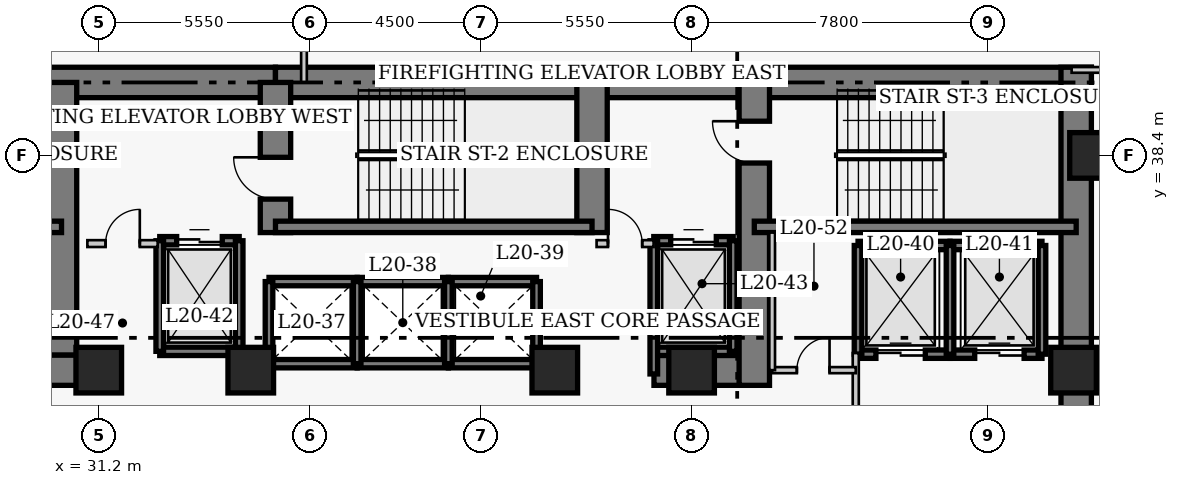
"""IFC4 building model, lengths in metres.
Left out: names, types, materials, properties, quantities, classifications, styles, units other than length and angle.
Written with IfcOpenShell. Run it as: python <this file> out.ifc"""

import sys

from ifc_helpers import new_model, si_unit, direction, frame, frame_2d, origin, origin_2d, place, context, subcontext, project, spatial, rectangle, extrude, element, fill, save


model = new_model("IFC4")
c1 = context("Model", 3, precision=1e-05, world=origin(), true_north=direction((0.0, 1.0)))
c2 = subcontext(c1, "Body", "Model", "MODEL_VIEW")
j1 = project(units=[si_unit("LENGTHUNIT", "METRE"), si_unit("PLANEANGLEUNIT", "RADIAN")], contexts=[c1])
p1 = place(None, origin())
s1 = spatial("IfcSite", under=j1, at=p1, CompositionType="ELEMENT")
p2 = place(p1, origin())
s2 = spatial("IfcBuilding", under=s1, at=p2, CompositionType="ELEMENT")
p3 = place(p2, frame((0.0, 0.0, 84.2)))
s3 = spatial("IfcBuildingStorey", under=s2, at=p3, CompositionType="ELEMENT", Elevation=84.2)
p4 = place(p3, frame((21.5, 40.32, 0.0), z_axis=(0.0, 0.0, 1.0), x_axis=(1.0, 0.0, 0.0)))
e1 = element("IfcWall", 1, at=p4, inside=s3, PredefinedType="SHEAR", context=c2, shape_type="SweptSolid", body=[
    extrude(rectangle(XDim=14.35, YDim=0.8, at=frame_2d((7.175, 0.0))), origin(), (0.0, 0.0, 1.0), 3.8),
])
p5 = place(p3, frame((35.85, 40.32, 0.0), z_axis=(0.0, 0.0, 1.0), x_axis=(1.0, 0.0, 0.0)))
e2 = element("IfcWall", 2, at=p5, inside=s3, PredefinedType="SHEAR", context=c2, shape_type="SweptSolid", body=[
    extrude(rectangle(XDim=12.6, YDim=0.8, at=frame_2d((6.3, 0.0))), origin(), (0.0, 0.0, 1.0), 3.8),
])
p6 = place(p3, frame((48.45, 40.32, 0.0), z_axis=(0.0, 0.0, 1.0), x_axis=(1.0, 0.0, 0.0)))
e3 = element("IfcWall", 3, at=p6, inside=s3, PredefinedType="SHEAR", context=c2, shape_type="SweptSolid", body=[
    extrude(rectangle(XDim=8.87, YDim=0.8, at=frame_2d((4.435, 0.0))), origin(), (0.0, 0.0, 1.0), 3.8),
])
p7 = place(p3, frame((56.92, 27.05, 0.0), z_axis=(0.0, 0.0, 1.0), x_axis=(0.0, 1.0, 0.0)))
e4 = element("IfcWall", 4, at=p7, inside=s3, PredefinedType="SHEAR", context=c2, shape_type="SweptSolid", body=[
    extrude(rectangle(XDim=13.67, YDim=0.8, at=frame_2d((6.835, 0.0))), origin(), (0.0, 0.0, 1.0), 3.8),
])
p8 = place(p3, frame((28.45, 32.75, 0.0), z_axis=(0.0, 0.0, 1.0), x_axis=(1.0, 0.0, 0.0)))
e5 = element("IfcWall", 5, at=p8, inside=s3, PredefinedType="SHEAR", context=c2, shape_type="SweptSolid", body=[
    extrude(rectangle(XDim=2.4, YDim=0.8, at=frame_2d((1.2, 0.0))), origin(), (0.0, 0.0, 1.0), 3.8),
])
p9 = place(p3, frame((45.81, 32.75, 0.0), z_axis=(0.0, 0.0, 1.0), x_axis=(1.0, 0.0, 0.0)))
e6 = element("IfcWall", 6, at=p9, inside=s3, PredefinedType="SHEAR", context=c2, shape_type="SweptSolid", body=[
    extrude(rectangle(XDim=2.64, YDim=0.8, at=frame_2d((1.32, 0.0))), origin(), (0.0, 0.0, 1.0), 3.8),
])
p10 = place(p3, frame((30.22, 33.15, 0.0), z_axis=(0.0, 0.0, 1.0), x_axis=(0.0, 1.0, 0.0)))
e7 = element("IfcWall", 7, at=p10, inside=s3, PredefinedType="SHEAR", context=c2, shape_type="SweptSolid", body=[
    extrude(rectangle(XDim=7.17, YDim=0.8, at=frame_2d((3.585, 0.0))), origin(), (0.0, 0.0, 1.0), 3.8),
])
p11 = place(p3, frame((35.85, 36.37, 0.0), z_axis=(0.0, 0.0, 1.0), x_axis=(0.0, 1.0, 0.0)))
e8 = element("IfcWall", 8, at=p11, inside=s3, PredefinedType="SHEAR", context=c2, shape_type="SweptSolid", body=[
    extrude(rectangle(XDim=3.95, YDim=0.8, at=frame_2d((1.975, 0.0))), origin(), (0.0, 0.0, 1.0), 3.8),
])
p12 = place(p11, frame((0.88, 0.0, 0.0)))
e9 = element("IfcOpeningElement", 9, at=p12, cuts=e8, PredefinedType="OPENING", context=c2, shape_type="SweptSolid", body=[
    extrude(rectangle(XDim=1.1, YDim=2.15, at=frame_2d((0.55, 1.075))), frame((0.0, 0.41, 0.0), z_axis=(0.0, -1.0, 0.0), x_axis=(1.0, 0.0, 0.0)), (0.0, 0.0, 1.0), 0.82),
])
p13 = place(p3, frame((44.18, 36.37, 0.0), z_axis=(0.0, 0.0, 1.0), x_axis=(0.0, 1.0, 0.0)))
e10 = element("IfcWall", 10, at=p13, inside=s3, PredefinedType="SHEAR", context=c2, shape_type="SweptSolid", body=[
    extrude(rectangle(XDim=3.95, YDim=0.8, at=frame_2d((1.975, 0.0))), origin(), (0.0, 0.0, 1.0), 3.8),
])
p14 = place(p3, frame((48.45, 32.35, 0.0), z_axis=(0.0, 0.0, 1.0), x_axis=(0.0, 1.0, 0.0)))
e11 = element("IfcWall", 11, at=p14, inside=s3, PredefinedType="SHEAR", context=c2, shape_type="SweptSolid", body=[
    extrude(rectangle(XDim=7.97, YDim=0.8, at=frame_2d((3.985, 0.0))), origin(), (0.0, 0.0, 1.0), 3.8),
])
p15 = place(p14, frame((5.85, 0.0, 0.0)))
e12 = element("IfcOpeningElement", 12, at=p15, cuts=e11, PredefinedType="OPENING", context=c2, shape_type="SweptSolid", body=[
    extrude(rectangle(XDim=1.1, YDim=2.15, at=frame_2d((0.55, 1.075))), frame((0.0, 0.41, 0.0), z_axis=(0.0, -1.0, 0.0), x_axis=(1.0, 0.0, 0.0)), (0.0, 0.0, 1.0), 0.82),
])
p16 = place(p3, frame((21.9, 36.52, 0.0), z_axis=(0.0, 0.0, 1.0), x_axis=(1.0, 0.0, 0.0)))
e13 = element("IfcWall", 13, at=p16, inside=s3, PredefinedType="SHEAR", context=c2, shape_type="SweptSolid", body=[
    extrude(rectangle(XDim=8.32, YDim=0.3, at=frame_2d((4.16, 0.0))), origin(), (0.0, 0.0, 1.0), 3.8),
])
p17 = place(p16, frame((0.9, 0.0, 0.0)))
e14 = element("IfcOpeningElement", 14, at=p17, cuts=e13, PredefinedType="OPENING", context=c2, shape_type="SweptSolid", body=[
    extrude(rectangle(XDim=1.1, YDim=2.15, at=frame_2d((0.55, 1.075))), frame((0.0, 0.16, 0.0), z_axis=(0.0, -1.0, 0.0), x_axis=(1.0, 0.0, 0.0)), (0.0, 0.0, 1.0), 0.32),
])
p18 = place(p3, frame((35.85, 36.52, 0.0), z_axis=(0.0, 0.0, 1.0), x_axis=(1.0, 0.0, 0.0)))
e15 = element("IfcWall", 15, at=p18, inside=s3, PredefinedType="SHEAR", context=c2, shape_type="SweptSolid", body=[
    extrude(rectangle(XDim=8.33, YDim=0.3, at=frame_2d((4.165, 0.0))), origin(), (0.0, 0.0, 1.0), 3.8),
])
p19 = place(p3, frame((48.45, 36.52, 0.0), z_axis=(0.0, 0.0, 1.0), x_axis=(1.0, 0.0, 0.0)))
e16 = element("IfcWall", 16, at=p19, inside=s3, PredefinedType="SHEAR", context=c2, shape_type="SweptSolid", body=[
    extrude(rectangle(XDim=8.47, YDim=0.3, at=frame_2d((4.235, 0.0))), origin(), (0.0, 0.0, 1.0), 3.8),
])
for number, where, z_axis, x_axis in (
    (17, (57.35, 38.4, 0.0), (0.0, 0.0, 1.0), (1.0, 0.0, 0.0)),
    (18, (31.2, 32.75, 0.0), (0.0, 0.0, 1.0), (1.0, 0.0, 0.0)),
    (19, (35.2, 32.75, 0.0), (0.0, 0.0, 1.0), (1.0, 0.0, 0.0)),
    (20, (43.2, 32.75, 0.0), (0.0, 0.0, 1.0), (1.0, 0.0, 0.0)),
    (21, (46.8, 32.75, 0.0), (0.0, 0.0, 1.0), (1.0, 0.0, 0.0)),
    (22, (56.85, 32.75, 0.0), (0.0, 0.0, 1.0), (1.0, 0.0, 0.0)),
):
    element("IfcColumn", number, at=place(p3, frame(where, z_axis=z_axis, x_axis=x_axis)), inside=s3, PredefinedType="COLUMN", context=c2, shape_type="SweptSolid", body=[
        extrude(rectangle(XDim=1.2, YDim=1.2, at=origin_2d()), origin(), (0.0, 0.0, 1.0), 3.8),
    ])
for number, where, z_axis, x_axis in (
    (23, (35.68, 35.08, 0.0), (0.0, 0.0, 1.0), (1.0, 0.0, 0.0)),
    (24, (35.68, 32.92, 0.0), (0.0, 0.0, 1.0), (1.0, 0.0, 0.0)),
):
    element("IfcWall", number, at=place(p3, frame(where, z_axis=z_axis, x_axis=x_axis)), inside=s3, PredefinedType="SHEAR", context=c2, shape_type="SweptSolid", body=[
        extrude(rectangle(XDim=2.32, YDim=0.22, at=frame_2d((1.16, 0.0))), origin(), (0.0, 0.0, 1.0), 3.8),
    ])
p20 = place(p3, frame((35.68, 32.92, 0.0), z_axis=(0.0, 0.0, 1.0), x_axis=(0.0, 1.0, 0.0)))
e25 = element("IfcWall", 25, at=p20, inside=s3, PredefinedType="SHEAR", context=c2, shape_type="SweptSolid", body=[
    extrude(rectangle(XDim=2.16, YDim=0.2, at=frame_2d((1.08, 0.0))), origin(), (0.0, 0.0, 1.0), 3.8),
])
for number, where, z_axis, x_axis in (
    (26, (38.0, 35.08, 0.0), (0.0, 0.0, 1.0), (1.0, 0.0, 0.0)),
    (27, (38.0, 32.92, 0.0), (0.0, 0.0, 1.0), (1.0, 0.0, 0.0)),
):
    element("IfcWall", number, at=place(p3, frame(where, z_axis=z_axis, x_axis=x_axis)), inside=s3, PredefinedType="SHEAR", context=c2, shape_type="SweptSolid", body=[
        extrude(rectangle(XDim=2.4, YDim=0.22, at=frame_2d((1.2, 0.0))), origin(), (0.0, 0.0, 1.0), 3.8),
    ])
p21 = place(p3, frame((38.0, 32.92, 0.0), z_axis=(0.0, 0.0, 1.0), x_axis=(0.0, 1.0, 0.0)))
e28 = element("IfcWall", 28, at=p21, inside=s3, PredefinedType="SHEAR", context=c2, shape_type="SweptSolid", body=[
    extrude(rectangle(XDim=2.16, YDim=0.2, at=frame_2d((1.08, 0.0))), origin(), (0.0, 0.0, 1.0), 3.8),
])
for number, where, z_axis, x_axis in (
    (29, (40.4, 35.08, 0.0), (0.0, 0.0, 1.0), (1.0, 0.0, 0.0)),
    (30, (40.4, 32.92, 0.0), (0.0, 0.0, 1.0), (1.0, 0.0, 0.0)),
):
    element("IfcWall", number, at=place(p3, frame(where, z_axis=z_axis, x_axis=x_axis)), inside=s3, PredefinedType="SHEAR", context=c2, shape_type="SweptSolid", body=[
        extrude(rectangle(XDim=2.32, YDim=0.22, at=frame_2d((1.16, 0.0))), origin(), (0.0, 0.0, 1.0), 3.8),
    ])
for number, where, z_axis, x_axis in (
    (31, (40.4, 32.92, 0.0), (0.0, 0.0, 1.0), (0.0, 1.0, 0.0)),
    (32, (42.72, 32.92, 0.0), (0.0, 0.0, 1.0), (0.0, 1.0, 0.0)),
):
    element("IfcWall", number, at=place(p3, frame(where, z_axis=z_axis, x_axis=x_axis)), inside=s3, PredefinedType="SHEAR", context=c2, shape_type="SweptSolid", body=[
        extrude(rectangle(XDim=2.16, YDim=0.2, at=frame_2d((1.08, 0.0))), origin(), (0.0, 0.0, 1.0), 3.8),
    ])
p22 = place(p3, frame((51.18, 36.03, 0.0), z_axis=(0.0, 0.0, 1.0), x_axis=(1.0, 0.0, 0.0)))
e33 = element("IfcWall", 33, at=p22, inside=s3, PredefinedType="SHEAR", context=c2, shape_type="SweptSolid", body=[
    extrude(rectangle(XDim=2.42, YDim=0.22, at=frame_2d((1.21, 0.0))), origin(), (0.0, 0.0, 1.0), 3.8),
])
p23 = place(p3, frame((51.18, 33.17, 0.0), z_axis=(0.0, 0.0, 1.0), x_axis=(1.0, 0.0, 0.0)))
e34 = element("IfcWall", 34, at=p23, inside=s3, PredefinedType="SHEAR", context=c2, shape_type="SweptSolid", body=[
    extrude(rectangle(XDim=2.42, YDim=0.22, at=frame_2d((1.21, 0.0))), origin(), (0.0, 0.0, 1.0), 3.8),
])
p24 = place(p23, frame((0.47, 0.0, 0.0)))
e35 = element("IfcOpeningElement", 35, at=p24, cuts=e34, PredefinedType="OPENING", context=c2, shape_type="SweptSolid", body=[
    extrude(rectangle(XDim=1.3, YDim=2.15, at=frame_2d((0.65, 1.075))), frame((0.0, 0.12, 0.0), z_axis=(0.0, -1.0, 0.0), x_axis=(1.0, 0.0, 0.0)), (0.0, 0.0, 1.0), 0.24),
])
p25 = place(p3, frame((51.18, 33.17, 0.0), z_axis=(0.0, 0.0, 1.0), x_axis=(0.0, 1.0, 0.0)))
e36 = element("IfcWall", 36, at=p25, inside=s3, PredefinedType="SHEAR", context=c2, shape_type="SweptSolid", body=[
    extrude(rectangle(XDim=2.86, YDim=0.2, at=frame_2d((1.43, 0.0))), origin(), (0.0, 0.0, 1.0), 3.8),
])
p26 = place(p3, frame((53.6, 36.03, 0.0), z_axis=(0.0, 0.0, 1.0), x_axis=(1.0, 0.0, 0.0)))
e37 = element("IfcWall", 37, at=p26, inside=s3, PredefinedType="SHEAR", context=c2, shape_type="SweptSolid", body=[
    extrude(rectangle(XDim=2.42, YDim=0.22, at=frame_2d((1.21, 0.0))), origin(), (0.0, 0.0, 1.0), 3.8),
])
p27 = place(p3, frame((53.6, 33.17, 0.0), z_axis=(0.0, 0.0, 1.0), x_axis=(1.0, 0.0, 0.0)))
e38 = element("IfcWall", 38, at=p27, inside=s3, PredefinedType="SHEAR", context=c2, shape_type="SweptSolid", body=[
    extrude(rectangle(XDim=2.42, YDim=0.22, at=frame_2d((1.21, 0.0))), origin(), (0.0, 0.0, 1.0), 3.8),
])
p28 = place(p27, frame((0.65, 0.0, 0.0)))
e39 = element("IfcOpeningElement", 39, at=p28, cuts=e38, PredefinedType="OPENING", context=c2, shape_type="SweptSolid", body=[
    extrude(rectangle(XDim=1.3, YDim=2.15, at=frame_2d((0.65, 1.075))), frame((0.0, 0.12, 0.0), z_axis=(0.0, -1.0, 0.0), x_axis=(1.0, 0.0, 0.0)), (0.0, 0.0, 1.0), 0.24),
])
for number, where, z_axis, x_axis in (
    (40, (53.6, 33.17, 0.0), (0.0, 0.0, 1.0), (0.0, 1.0, 0.0)),
    (41, (56.02, 33.17, 0.0), (0.0, 0.0, 1.0), (0.0, 1.0, 0.0)),
):
    element("IfcWall", number, at=place(p3, frame(where, z_axis=z_axis, x_axis=x_axis)), inside=s3, PredefinedType="SHEAR", context=c2, shape_type="SweptSolid", body=[
        extrude(rectangle(XDim=2.86, YDim=0.2, at=frame_2d((1.43, 0.0))), origin(), (0.0, 0.0, 1.0), 3.8),
    ])
p29 = place(p3, frame((32.805, 36.155, 0.0), z_axis=(0.0, 0.0, 1.0), x_axis=(1.0, 0.0, 0.0)))
e42 = element("IfcWall", 42, at=p29, inside=s3, PredefinedType="SHEAR", context=c2, shape_type="SweptSolid", body=[
    extrude(rectangle(XDim=2.09, YDim=0.22, at=frame_2d((1.045, 0.0))), origin(), (0.0, 0.0, 1.0), 3.8),
])
p30 = place(p29, frame((0.445, 0.0, 0.0)))
e43 = element("IfcOpeningElement", 43, at=p30, cuts=e42, PredefinedType="OPENING", context=c2, shape_type="SweptSolid", body=[
    extrude(rectangle(XDim=1.2, YDim=2.15, at=frame_2d((0.6, 1.075))), frame((0.0, 0.12, 0.0), z_axis=(0.0, -1.0, 0.0), x_axis=(1.0, 0.0, 0.0)), (0.0, 0.0, 1.0), 0.24),
])
p31 = place(p3, frame((32.805, 33.245, 0.0), z_axis=(0.0, 0.0, 1.0), x_axis=(1.0, 0.0, 0.0)))
e44 = element("IfcWall", 44, at=p31, inside=s3, PredefinedType="SHEAR", context=c2, shape_type="SweptSolid", body=[
    extrude(rectangle(XDim=2.09, YDim=0.22, at=frame_2d((1.045, 0.0))), origin(), (0.0, 0.0, 1.0), 3.8),
])
for number, where, z_axis, x_axis in (
    (45, (32.805, 33.245, 0.0), (0.0, 0.0, 1.0), (0.0, 1.0, 0.0)),
    (46, (34.895, 33.245, 0.0), (0.0, 0.0, 1.0), (0.0, 1.0, 0.0)),
):
    element("IfcWall", number, at=place(p3, frame(where, z_axis=z_axis, x_axis=x_axis)), inside=s3, PredefinedType="SHEAR", context=c2, shape_type="SweptSolid", body=[
        extrude(rectangle(XDim=2.91, YDim=0.2, at=frame_2d((1.455, 0.0))), origin(), (0.0, 0.0, 1.0), 3.8),
    ])
p32 = place(p3, frame((45.805, 36.155, 0.0), z_axis=(0.0, 0.0, 1.0), x_axis=(1.0, 0.0, 0.0)))
e47 = element("IfcWall", 47, at=p32, inside=s3, PredefinedType="SHEAR", context=c2, shape_type="SweptSolid", body=[
    extrude(rectangle(XDim=2.09, YDim=0.22, at=frame_2d((1.045, 0.0))), origin(), (0.0, 0.0, 1.0), 3.8),
])
p33 = place(p32, frame((0.445, 0.0, 0.0)))
e48 = element("IfcOpeningElement", 48, at=p33, cuts=e47, PredefinedType="OPENING", context=c2, shape_type="SweptSolid", body=[
    extrude(rectangle(XDim=1.2, YDim=2.15, at=frame_2d((0.6, 1.075))), frame((0.0, 0.12, 0.0), z_axis=(0.0, -1.0, 0.0), x_axis=(1.0, 0.0, 0.0)), (0.0, 0.0, 1.0), 0.24),
])
p34 = place(p3, frame((45.805, 33.245, 0.0), z_axis=(0.0, 0.0, 1.0), x_axis=(1.0, 0.0, 0.0)))
e49 = element("IfcWall", 49, at=p34, inside=s3, PredefinedType="SHEAR", context=c2, shape_type="SweptSolid", body=[
    extrude(rectangle(XDim=2.09, YDim=0.22, at=frame_2d((1.045, 0.0))), origin(), (0.0, 0.0, 1.0), 3.8),
])
p35 = place(p3, frame((45.805, 32.65, 0.0), z_axis=(0.0, 0.0, 1.0), x_axis=(0.0, 1.0, 0.0)))
e50 = element("IfcWall", 50, at=p35, inside=s3, PredefinedType="SHEAR", context=c2, shape_type="SweptSolid", body=[
    extrude(rectangle(XDim=3.505, YDim=0.2, at=frame_2d((1.752, 0.0))), origin(), (0.0, 0.0, 1.0), 3.8),
])
p36 = place(p3, frame((47.895, 33.245, 0.0), z_axis=(0.0, 0.0, 1.0), x_axis=(0.0, 1.0, 0.0)))
e51 = element("IfcWall", 51, at=p36, inside=s3, PredefinedType="SHEAR", context=c2, shape_type="SweptSolid", body=[
    extrude(rectangle(XDim=2.91, YDim=0.2, at=frame_2d((1.455, 0.0))), origin(), (0.0, 0.0, 1.0), 3.8),
])
p37 = place(p3, frame((30.9, 36.08, 0.0), z_axis=(0.0, 0.0, 1.0), x_axis=(1.0, 0.0, 0.0)))
e52 = element("IfcWall", 52, at=p37, inside=s3, PredefinedType="PARTITIONING", context=c2, shape_type="SweptSolid", body=[
    extrude(rectangle(XDim=1.85, YDim=0.18, at=frame_2d((0.925, 0.0))), origin(), (0.0, 0.0, 1.0), 3.54),
])
p38 = place(p37, frame((0.48, 0.0, 0.0)))
e53 = element("IfcOpeningElement", 53, at=p38, cuts=e52, PredefinedType="OPENING", context=c2, shape_type="SweptSolid", body=[
    extrude(rectangle(XDim=0.9, YDim=2.15, at=frame_2d((0.45, 1.075))), frame((0.0, 0.1, 0.0), z_axis=(0.0, -1.0, 0.0), x_axis=(1.0, 0.0, 0.0)), (0.0, 0.0, 1.0), 0.2),
])
p39 = place(p3, frame((44.3, 36.08, 0.0), z_axis=(0.0, 0.0, 1.0), x_axis=(1.0, 0.0, 0.0)))
e54 = element("IfcWall", 54, at=p39, inside=s3, PredefinedType="PARTITIONING", context=c2, shape_type="SweptSolid", body=[
    extrude(rectangle(XDim=1.5, YDim=0.18, at=frame_2d((0.75, 0.0))), origin(), (0.0, 0.0, 1.0), 3.54),
])
p40 = place(p39, frame((0.3, 0.0, 0.0)))
e55 = element("IfcOpeningElement", 55, at=p40, cuts=e54, PredefinedType="OPENING", context=c2, shape_type="SweptSolid", body=[
    extrude(rectangle(XDim=0.9, YDim=2.15, at=frame_2d((0.45, 1.075))), frame((0.0, 0.1, 0.0), z_axis=(0.0, -1.0, 0.0), x_axis=(1.0, 0.0, 0.0)), (0.0, 0.0, 1.0), 0.2),
])
p41 = place(p3, frame((51.12, 29.5, 0.0), z_axis=(0.0, 0.0, 1.0), x_axis=(0.0, 1.0, 0.0)))
e56 = element("IfcWall", 56, at=p41, inside=s3, PredefinedType="PARTITIONING", context=c2, shape_type="SweptSolid", body=[
    extrude(rectangle(XDim=3.7, YDim=0.16, at=frame_2d((1.85, 0.0))), origin(), (0.0, 0.0, 1.0), 3.54),
])
p42 = place(p41, frame((0.9, 0.0, 0.0)))
e57 = element("IfcOpeningElement", 57, at=p42, cuts=e56, PredefinedType="OPENING", context=c2, shape_type="SweptSolid", body=[
    extrude(rectangle(XDim=1.1, YDim=2.15, at=frame_2d((0.55, 1.075))), frame((0.0, 0.09, 0.0), z_axis=(0.0, -1.0, 0.0), x_axis=(1.0, 0.0, 0.0)), (0.0, 0.0, 1.0), 0.18),
])
p43 = place(p3, frame((48.92, 32.75, 0.0), z_axis=(0.0, 0.0, 1.0), x_axis=(1.0, 0.0, 0.0)))
e58 = element("IfcWall", 58, at=p43, inside=s3, PredefinedType="PARTITIONING", context=c2, shape_type="SweptSolid", body=[
    extrude(rectangle(XDim=2.2, YDim=0.16, at=frame_2d((1.1, 0.0))), origin(), (0.0, 0.0, 1.0), 3.54),
])
p44 = place(p43, frame((0.65, 0.0, 0.0)))
e59 = element("IfcOpeningElement", 59, at=p44, cuts=e58, PredefinedType="OPENING", context=c2, shape_type="SweptSolid", body=[
    extrude(rectangle(XDim=0.86, YDim=2.05, at=frame_2d((0.43, 1.025))), frame((0.0, 0.09, 0.0), z_axis=(0.0, -1.0, 0.0), x_axis=(1.0, 0.0, 0.0)), (0.0, 0.0, 1.0), 0.18),
])
p45 = place(p3, frame((48.92, 32.75, 0.0), z_axis=(0.0, 0.0, 1.0), x_axis=(0.0, 1.0, 0.0)))
e60 = element("IfcWall", 60, at=p45, inside=s3, PredefinedType="PARTITIONING", context=c2, shape_type="SweptSolid", body=[
    extrude(rectangle(XDim=3.62, YDim=0.15, at=frame_2d((1.81, 0.0))), origin(), (0.0, 0.0, 1.0), 3.54),
])
p46 = place(p3, frame((56.8, 40.65, 0.0), z_axis=(0.0, 0.0, 1.0), x_axis=(1.0, 0.0, 0.0)))
e61 = element("IfcWall", 61, at=p46, inside=s3, PredefinedType="PARTITIONING", context=c2, shape_type="SweptSolid", body=[
    extrude(rectangle(XDim=3.81, YDim=0.15, at=frame_2d((1.905, 0.0))), origin(), (0.0, 0.0, 1.0), 3.54),
])
p47 = place(p46, frame((2.2, 0.0, 0.0)))
e62 = element("IfcOpeningElement", 62, at=p47, cuts=e61, PredefinedType="OPENING", context=c2, shape_type="SweptSolid", body=[
    extrude(rectangle(XDim=1.0, YDim=2.15, at=frame_2d((0.5, 1.075))), frame((0.0, 0.085, 0.0), z_axis=(0.0, -1.0, 0.0), x_axis=(1.0, 0.0, 0.0)), (0.0, 0.0, 1.0), 0.17),
])
p48 = place(p3, frame((36.6, 40.32, 0.0), z_axis=(0.0, 0.0, 1.0), x_axis=(0.0, 1.0, 0.0)))
e63 = element("IfcWall", 63, at=p48, inside=s3, PredefinedType="PARTITIONING", context=c2, shape_type="SweptSolid", body=[
    extrude(rectangle(XDim=3.445, YDim=0.15, at=frame_2d((1.723, 0.0))), origin(), (0.0, 0.0, 1.0), 3.54),
])
p49 = place(p24, origin())
e64 = element("IfcDoor", 64, at=p49, inside=s3, OperationType="DOUBLE_DOOR_SLIDING", PredefinedType="DOOR", context=c2, shape_type="SweptSolid", body=[
    extrude(rectangle(XDim=1.3, YDim=2.15, at=frame_2d((0.65, 1.075))), frame((0.0, 0.025, 0.0), z_axis=(0.0, -1.0, 0.0), x_axis=(1.0, 0.0, 0.0)), (0.0, 0.0, 1.0), 0.05),
])
fill(e35, e64)
p50 = place(p28, origin())
e65 = element("IfcDoor", 65, at=p50, inside=s3, OperationType="DOUBLE_DOOR_SLIDING", PredefinedType="DOOR", context=c2, shape_type="SweptSolid", body=[
    extrude(rectangle(XDim=1.3, YDim=2.15, at=frame_2d((0.65, 1.075))), frame((0.0, 0.025, 0.0), z_axis=(0.0, -1.0, 0.0), x_axis=(1.0, 0.0, 0.0)), (0.0, 0.0, 1.0), 0.05),
])
fill(e39, e65)
p51 = place(p30, origin())
e66 = element("IfcDoor", 66, at=p51, inside=s3, OperationType="DOUBLE_DOOR_SLIDING", PredefinedType="DOOR", context=c2, shape_type="SweptSolid", body=[
    extrude(rectangle(XDim=1.2, YDim=2.15, at=frame_2d((0.6, 1.075))), frame((0.0, 0.025, 0.0), z_axis=(0.0, -1.0, 0.0), x_axis=(1.0, 0.0, 0.0)), (0.0, 0.0, 1.0), 0.05),
])
fill(e43, e66)
p52 = place(p33, origin())
e67 = element("IfcDoor", 67, at=p52, inside=s3, OperationType="DOUBLE_DOOR_SLIDING", PredefinedType="DOOR", context=c2, shape_type="SweptSolid", body=[
    extrude(rectangle(XDim=1.2, YDim=2.15, at=frame_2d((0.6, 1.075))), frame((0.0, 0.025, 0.0), z_axis=(0.0, -1.0, 0.0), x_axis=(1.0, 0.0, 0.0)), (0.0, 0.0, 1.0), 0.05),
])
fill(e48, e67)
p53 = place(p38, origin())
e68 = element("IfcDoor", 68, at=p53, inside=s3, OperationType="SINGLE_SWING_RIGHT", PredefinedType="DOOR", context=c2, shape_type="SweptSolid", body=[
    extrude(rectangle(XDim=0.9, YDim=2.15, at=frame_2d((0.45, 1.075))), frame((0.0, 0.025, 0.0), z_axis=(0.0, -1.0, 0.0), x_axis=(1.0, 0.0, 0.0)), (0.0, 0.0, 1.0), 0.05),
])
fill(e53, e68)
p54 = place(p40, origin())
e69 = element("IfcDoor", 69, at=p54, inside=s3, OperationType="SINGLE_SWING_LEFT", PredefinedType="DOOR", context=c2, shape_type="SweptSolid", body=[
    extrude(rectangle(XDim=0.9, YDim=2.15, at=frame_2d((0.45, 1.075))), frame((0.0, 0.025, 0.0), z_axis=(0.0, -1.0, 0.0), x_axis=(1.0, 0.0, 0.0)), (0.0, 0.0, 1.0), 0.05),
])
fill(e55, e69)
p55 = place(p44, origin())
e70 = element("IfcDoor", 70, at=p55, inside=s3, OperationType="SINGLE_SWING_RIGHT", PredefinedType="DOOR", context=c2, shape_type="SweptSolid", body=[
    extrude(rectangle(XDim=0.86, YDim=2.05, at=frame_2d((0.43, 1.025))), frame((0.0, 0.025, 0.0), z_axis=(0.0, -1.0, 0.0), x_axis=(1.0, 0.0, 0.0)), (0.0, 0.0, 1.0), 0.05),
])
fill(e59, e70)
p56 = place(p12, origin())
e71 = element("IfcDoor", 71, at=p56, inside=s3, OperationType="SINGLE_SWING_RIGHT", PredefinedType="DOOR", context=c2, shape_type="SweptSolid", body=[
    extrude(rectangle(XDim=1.1, YDim=2.15, at=frame_2d((0.55, 1.075))), frame((0.0, 0.025, 0.0), z_axis=(0.0, -1.0, 0.0), x_axis=(1.0, 0.0, 0.0)), (0.0, 0.0, 1.0), 0.05),
])
fill(e9, e71)
p57 = place(p15, origin())
e72 = element("IfcDoor", 72, at=p57, inside=s3, OperationType="SINGLE_SWING_RIGHT", PredefinedType="DOOR", context=c2, shape_type="SweptSolid", body=[
    extrude(rectangle(XDim=1.1, YDim=2.15, at=frame_2d((0.55, 1.075))), frame((0.0, 0.025, 0.0), z_axis=(0.0, -1.0, 0.0), x_axis=(1.0, 0.0, 0.0)), (0.0, 0.0, 1.0), 0.05),
])
fill(e12, e72)
save(model, sys.argv[1])
